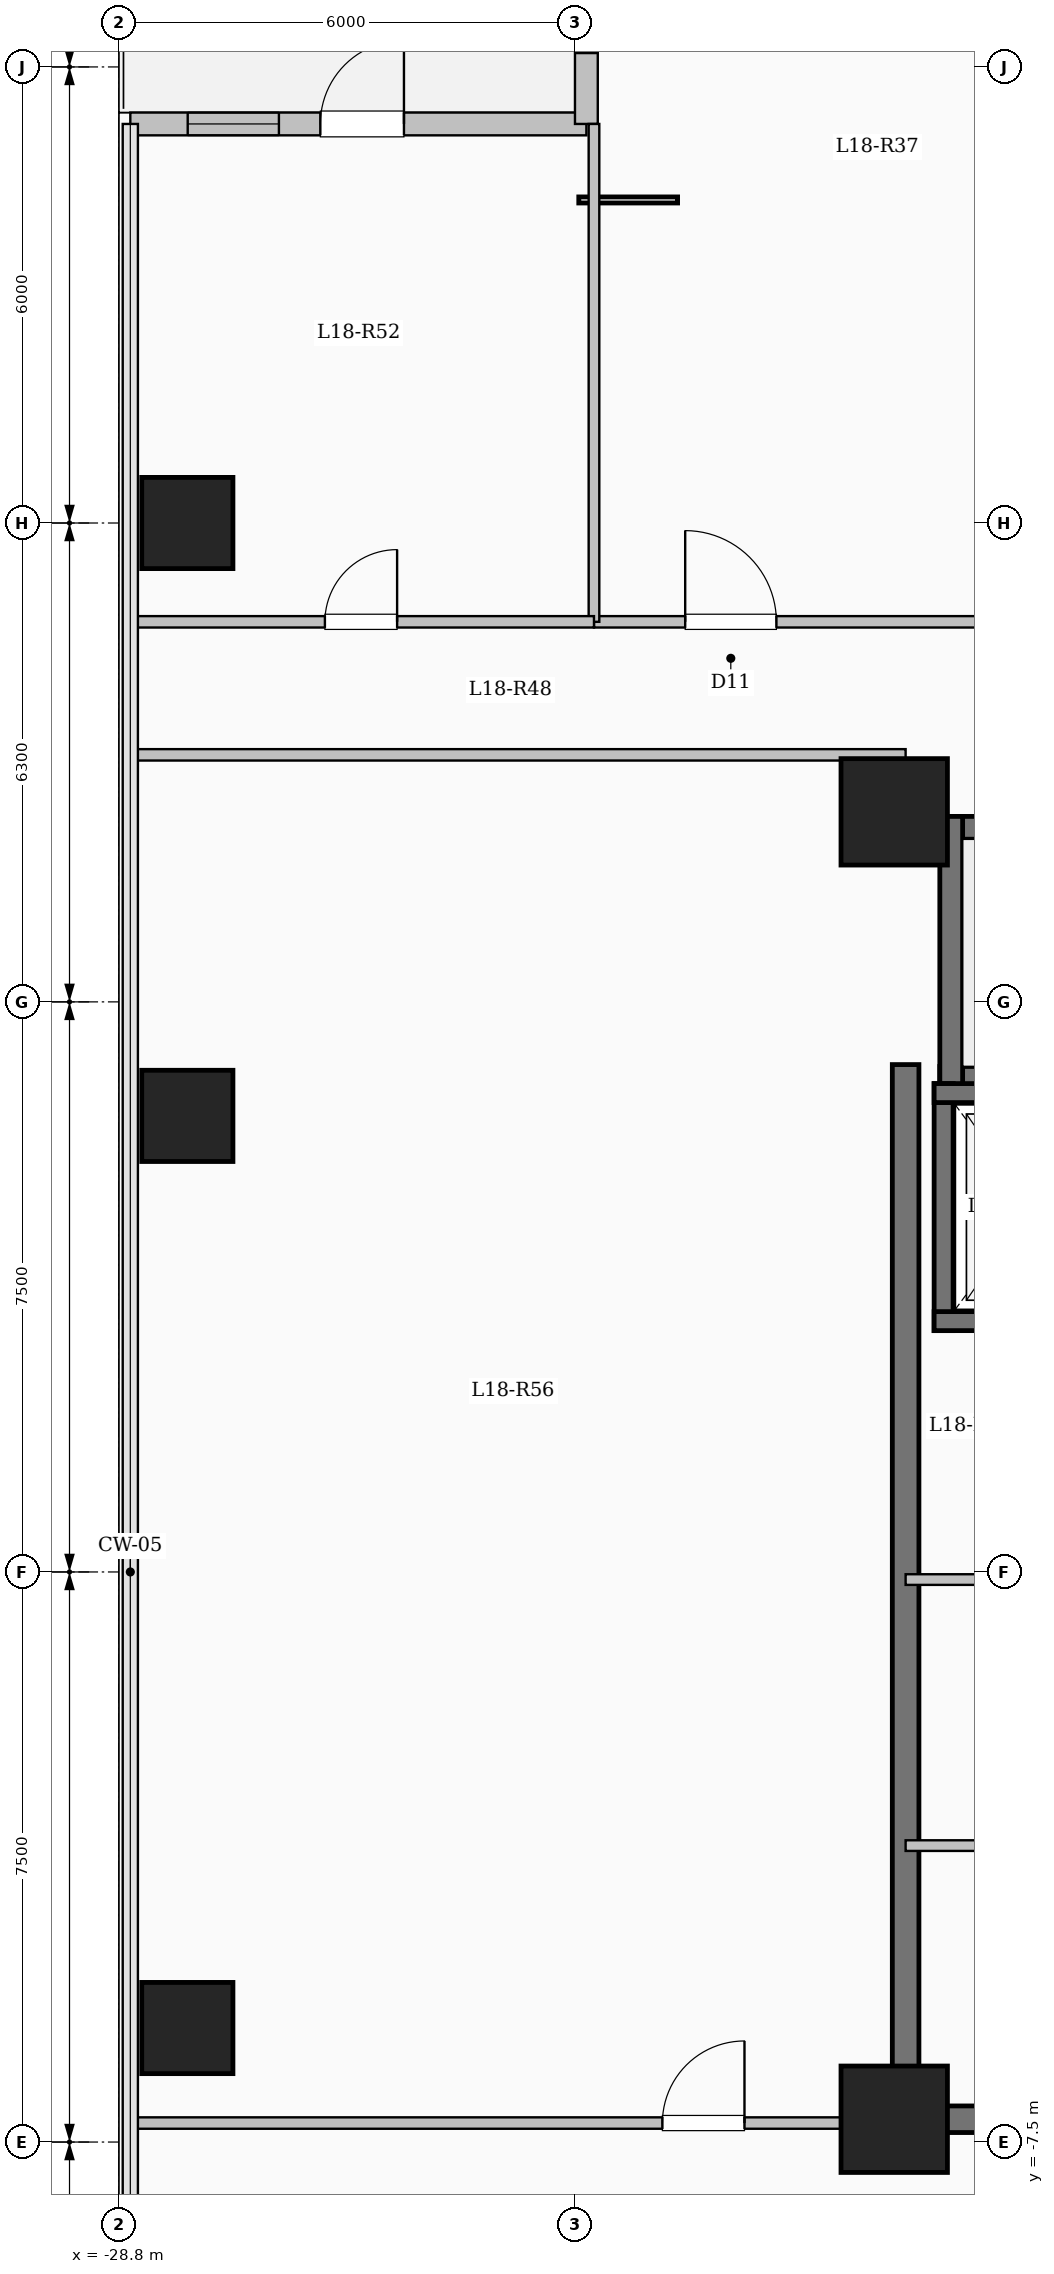
"""IFC4 building model, lengths in metres.
Left out: names, types, materials, properties, quantities, classifications, styles, units other than length and angle.
Written with IfcOpenShell. Run it as: python <this file> out.ifc"""

import sys

from ifc_helpers import new_model, si_unit, direction, frame, frame_2d, origin, origin_2d, place, context, subcontext, project, spatial, rectangle, extrude, element, fill, save


model = new_model("IFC4")
c1 = context("Model", 3, precision=1e-05, world=origin(), true_north=direction((0.0, 1.0)))
c2 = subcontext(c1, "Body", "Model", "MODEL_VIEW")
j1 = project(units=[si_unit("LENGTHUNIT", "METRE"), si_unit("PLANEANGLEUNIT", "RADIAN")], contexts=[c1])
p1 = place(None, origin())
s1 = spatial("IfcSite", under=j1, at=p1, CompositionType="ELEMENT")
p2 = place(p1, origin())
s2 = spatial("IfcBuilding", under=s1, at=p2, CompositionType="ELEMENT")
p3 = place(p2, frame((0.0, 0.0, 68.7)))
s3 = spatial("IfcBuildingStorey", under=s2, at=p3, CompositionType="ELEMENT", Elevation=68.7)
for number, where, z_axis, x_axis in (
    (1, (-18.6, -7.2, 0.0), (0.0, 0.0, 1.0), (1.0, 0.0, 0.0)),
    (2, (-18.6, 10.0, 0.0), (0.0, 0.0, 1.0), (1.0, 0.0, 0.0)),
):
    element("IfcColumn", number, at=place(p3, frame(where, z_axis=z_axis, x_axis=x_axis)), inside=s3, PredefinedType="COLUMN", context=c2, shape_type="SweptSolid", body=[
        extrude(rectangle(XDim=1.4, YDim=1.4, at=origin_2d()), origin(), (0.0, 0.0, 1.0), 4.5),
    ])
for number, where, z_axis, x_axis in (
    (3, (-27.9, -6.0, 0.0), (0.0, 0.0, 1.0), (1.0, 0.0, 0.0)),
    (4, (-27.9, 6.0, 0.0), (0.0, 0.0, 1.0), (1.0, 0.0, 0.0)),
    (5, (-27.9, 13.8, 0.0), (0.0, 0.0, 1.0), (1.0, 0.0, 0.0)),
):
    element("IfcColumn", number, at=place(p3, frame(where, z_axis=z_axis, x_axis=x_axis)), inside=s3, PredefinedType="COLUMN", context=c2, shape_type="SweptSolid", body=[
        extrude(rectangle(XDim=1.2, YDim=1.2, at=origin_2d()), origin(), (0.0, 0.0, 1.0), 4.5),
    ])
p4 = place(p3, frame((-28.65, 19.05, 0.0), z_axis=(0.0, 0.0, 1.0), x_axis=(1.0, 0.0, 0.0)))
e6 = element("IfcWall", 6, at=p4, inside=s3, PredefinedType="SOLIDWALL", context=c2, shape_type="SweptSolid", body=[
    extrude(rectangle(XDim=6.0, YDim=0.3, at=frame_2d((3.0, 0.0))), origin(), (0.0, 0.0, 1.0), 4.2),
])
p5 = place(p4, frame((2.5, 0.0, 0.0)))
e7 = element("IfcOpeningElement", 7, at=p5, cuts=e6, PredefinedType="OPENING", context=c2, shape_type="SweptSolid", body=[
    extrude(rectangle(XDim=1.1, YDim=2.2, at=frame_2d((0.55, 1.1))), frame((0.0, 0.16, 0.0), z_axis=(0.0, -1.0, 0.0), x_axis=(1.0, 0.0, 0.0)), (0.0, 0.0, 1.0), 0.32),
])
p6 = place(p4, frame((0.755, 0.0, 0.95)))
e8 = element("IfcOpeningElement", 8, at=p6, cuts=e6, PredefinedType="OPENING", context=c2, shape_type="SweptSolid", body=[
    extrude(rectangle(XDim=1.2, YDim=1.5, at=frame_2d((0.6, 0.75))), frame((0.0, 0.16, 0.0), z_axis=(0.0, -1.0, 0.0), x_axis=(1.0, 0.0, 0.0)), (0.0, 0.0, 1.0), 0.32),
])
p7 = place(p3, frame((-22.65, 19.05, 0.0), z_axis=(0.0, 0.0, 1.0), x_axis=(0.0, 1.0, 0.0)))
e9 = element("IfcWall", 9, at=p7, inside=s3, PredefinedType="SOLIDWALL", context=c2, shape_type="SweptSolid", body=[
    extrude(rectangle(XDim=4.5, YDim=0.3, at=frame_2d((2.25, 0.0))), origin(), (0.0, 0.0, 1.0), 4.2),
])
p8 = place(p7, frame((0.933, 0.0, 0.85)))
e10 = element("IfcOpeningElement", 10, at=p8, cuts=e9, PredefinedType="OPENING", context=c2, shape_type="SweptSolid", body=[
    extrude(rectangle(XDim=2.6, YDim=2.4, at=frame_2d((1.3, 1.2))), frame((0.0, 0.16, 0.0), z_axis=(0.0, -1.0, 0.0), x_axis=(1.0, 0.0, 0.0)), (0.0, 0.0, 1.0), 0.32),
])
p9 = place(p3, frame((-18.0, 9.79, 0.0), z_axis=(0.0, 0.0, 1.0), x_axis=(1.0, 0.0, 0.0)))
e11 = element("IfcWall", 11, at=p9, inside=s3, PredefinedType="SHEAR", context=c2, shape_type="SweptSolid", body=[
    extrude(rectangle(XDim=8.0, YDim=0.3, at=frame_2d((4.0, 0.0))), origin(), (0.0, 0.0, 1.0), 4.5),
])
p10 = place(p3, frame((-18.0, 6.5, 0.0), z_axis=(0.0, 0.0, 1.0), x_axis=(1.0, 0.0, 0.0)))
e12 = element("IfcWall", 12, at=p10, inside=s3, PredefinedType="SHEAR", context=c2, shape_type="SweptSolid", body=[
    extrude(rectangle(XDim=8.0, YDim=0.3, at=frame_2d((4.0, 0.0))), origin(), (0.0, 0.0, 1.0), 4.5),
])
p11 = place(p10, frame((6.45, 0.0, 0.0)))
e13 = element("IfcOpeningElement", 13, at=p11, cuts=e12, PredefinedType="OPENING", context=c2, shape_type="SweptSolid", body=[
    extrude(rectangle(XDim=1.0, YDim=2.15, at=frame_2d((0.5, 1.075))), frame((0.0, 0.16, 0.0), z_axis=(0.0, -1.0, 0.0), x_axis=(1.0, 0.0, 0.0)), (0.0, 0.0, 1.0), 0.32),
])
p12 = place(p3, frame((-17.85, 6.35, 0.0), z_axis=(0.0, 0.0, 1.0), x_axis=(0.0, 1.0, 0.0)))
e14 = element("IfcWall", 14, at=p12, inside=s3, PredefinedType="SHEAR", context=c2, shape_type="SweptSolid", body=[
    extrude(rectangle(XDim=3.59, YDim=0.3, at=frame_2d((1.795, 0.0))), origin(), (0.0, 0.0, 1.0), 4.5),
])
p13 = place(p3, frame((-17.95, 3.175, 0.0), z_axis=(0.0, 0.0, 1.0), x_axis=(0.0, 1.0, 0.0)))
e15 = element("IfcWall", 15, at=p13, inside=s3, PredefinedType="SHEAR", context=c2, shape_type="SweptSolid", body=[
    extrude(rectangle(XDim=3.25, YDim=0.25, at=frame_2d((1.625, 0.0))), origin(), (0.0, 0.0, 1.0), 4.5),
])
for number, where, z_axis, x_axis in (
    (16, (-18.075, 3.3, 0.0), (0.0, 0.0, 1.0), (1.0, 0.0, 0.0)),
    (17, (-18.075, 6.3, 0.0), (0.0, 0.0, 1.0), (1.0, 0.0, 0.0)),
):
    element("IfcWall", number, at=place(p3, frame(where, z_axis=z_axis, x_axis=x_axis)), inside=s3, PredefinedType="SHEAR", context=c2, shape_type="SweptSolid", body=[
        extrude(rectangle(XDim=2.55, YDim=0.25, at=frame_2d((1.275, 0.0))), origin(), (0.0, 0.0, 1.0), 4.5),
    ])
p14 = place(p3, frame((-18.45, -7.375, 0.0), z_axis=(0.0, 0.0, 1.0), x_axis=(0.0, 1.0, 0.0)))
e18 = element("IfcWall", 18, at=p14, inside=s3, PredefinedType="SHEAR", context=c2, shape_type="SweptSolid", body=[
    extrude(rectangle(XDim=14.05, YDim=0.35, at=frame_2d((7.025, 0.0))), origin(), (0.0, 0.0, 1.0), 4.5),
])
p15 = place(p3, frame((-18.625, -7.2, 0.0), z_axis=(0.0, 0.0, 1.0), x_axis=(1.0, 0.0, 0.0)))
e19 = element("IfcWall", 19, at=p15, inside=s3, PredefinedType="SHEAR", context=c2, shape_type="SweptSolid", body=[
    extrude(rectangle(XDim=8.55, YDim=0.35, at=frame_2d((4.275, 0.0))), origin(), (0.0, 0.0, 1.0), 4.5),
])
p16 = place(p3, frame((-18.45, -3.6, 0.0), z_axis=(0.0, 0.0, 1.0), x_axis=(1.0, 0.0, 0.0)))
e20 = element("IfcWall", 20, at=p16, inside=s3, PredefinedType="PARTITIONING", context=c2, shape_type="SweptSolid", body=[
    extrude(rectangle(XDim=3.05, YDim=0.14, at=frame_2d((1.525, 0.0))), origin(), (0.0, 0.0, 1.0), 4.2),
])
p17 = place(p16, frame((1.05, 0.0, 0.0)))
e21 = element("IfcOpeningElement", 21, at=p17, cuts=e20, PredefinedType="OPENING", context=c2, shape_type="SweptSolid", body=[
    extrude(rectangle(XDim=0.9, YDim=2.08, at=frame_2d((0.45, 1.04))), frame((0.0, 0.08, 0.0), z_axis=(0.0, -1.0, 0.0), x_axis=(1.0, 0.0, 0.0)), (0.0, 0.0, 1.0), 0.16),
])
p18 = place(p3, frame((-18.45, -0.1, 0.0), z_axis=(0.0, 0.0, 1.0), x_axis=(1.0, 0.0, 0.0)))
e22 = element("IfcWall", 22, at=p18, inside=s3, PredefinedType="PARTITIONING", context=c2, shape_type="SweptSolid", body=[
    extrude(rectangle(XDim=3.05, YDim=0.14, at=frame_2d((1.525, 0.0))), origin(), (0.0, 0.0, 1.0), 4.2),
])
p19 = place(p18, frame((1.05, 0.0, 0.0)))
e23 = element("IfcOpeningElement", 23, at=p19, cuts=e22, PredefinedType="OPENING", context=c2, shape_type="SweptSolid", body=[
    extrude(rectangle(XDim=0.9, YDim=2.08, at=frame_2d((0.45, 1.04))), frame((0.0, 0.08, 0.0), z_axis=(0.0, -1.0, 0.0), x_axis=(1.0, 0.0, 0.0)), (0.0, 0.0, 1.0), 0.16),
])
p20 = place(p3, frame((-22.55, 12.5, 0.0), z_axis=(0.0, 0.0, 1.0), x_axis=(1.0, 0.0, 0.0)))
e24 = element("IfcWall", 24, at=p20, inside=s3, PredefinedType="PARTITIONING", context=c2, shape_type="SweptSolid", body=[
    extrude(rectangle(XDim=18.7, YDim=0.15, at=frame_2d((9.35, 0.0))), origin(), (0.0, 0.0, 1.0), 4.2),
])
p21 = place(p20, frame((1.2, 0.0, 0.0)))
e25 = element("IfcOpeningElement", 25, at=p21, cuts=e24, PredefinedType="OPENING", context=c2, shape_type="SweptSolid", body=[
    extrude(rectangle(XDim=1.2, YDim=2.15, at=frame_2d((0.6, 1.075))), frame((0.0, 0.085, 0.0), z_axis=(0.0, -1.0, 0.0), x_axis=(1.0, 0.0, 0.0)), (0.0, 0.0, 1.0), 0.17),
])
p22 = place(p20, frame((8.633, 0.0, 0.0)))
e26 = element("IfcOpeningElement", 26, at=p22, cuts=e24, PredefinedType="OPENING", context=c2, shape_type="SweptSolid", body=[
    extrude(rectangle(XDim=1.08, YDim=2.15, at=frame_2d((0.54, 1.075))), frame((0.0, 0.085, 0.0), z_axis=(0.0, -1.0, 0.0), x_axis=(1.0, 0.0, 0.0)), (0.0, 0.0, 1.0), 0.17),
])
p23 = place(p3, frame((-28.68, -7.25, 0.0), z_axis=(0.0, 0.0, 1.0), x_axis=(1.0, 0.0, 0.0)))
e27 = element("IfcWall", 27, at=p23, inside=s3, PredefinedType="PARTITIONING", context=c2, shape_type="SweptSolid", body=[
    extrude(rectangle(XDim=10.23, YDim=0.15, at=frame_2d((5.115, 0.0))), origin(), (0.0, 0.0, 1.0), 4.2),
])
p24 = place(p23, frame((7.03, 0.0, 0.0)))
e28 = element("IfcOpeningElement", 28, at=p24, cuts=e27, PredefinedType="OPENING", context=c2, shape_type="SweptSolid", body=[
    extrude(rectangle(XDim=1.08, YDim=2.15, at=frame_2d((0.54, 1.075))), frame((0.0, 0.085, 0.0), z_axis=(0.0, -1.0, 0.0), x_axis=(1.0, 0.0, 0.0)), (0.0, 0.0, 1.0), 0.17),
])
p25 = place(p3, frame((-28.68, 10.75, 0.0), z_axis=(0.0, 0.0, 1.0), x_axis=(1.0, 0.0, 0.0)))
e29 = element("IfcWall", 29, at=p25, inside=s3, PredefinedType="PARTITIONING", context=c2, shape_type="SweptSolid", body=[
    extrude(rectangle(XDim=10.23, YDim=0.15, at=frame_2d((5.115, 0.0))), origin(), (0.0, 0.0, 1.0), 4.2),
])
p26 = place(p3, frame((-22.55, 12.5, 0.0), z_axis=(0.0, 0.0, 1.0), x_axis=(0.0, 1.0, 0.0)))
e30 = element("IfcWall", 30, at=p26, inside=s3, PredefinedType="PARTITIONING", context=c2, shape_type="SweptSolid", body=[
    extrude(rectangle(XDim=6.55, YDim=0.14, at=frame_2d((3.275, 0.0))), origin(), (0.0, 0.0, 1.0), 4.2),
])
p27 = place(p3, frame((-28.68, 12.5, 0.0), z_axis=(0.0, 0.0, 1.0), x_axis=(1.0, 0.0, 0.0)))
e31 = element("IfcWall", 31, at=p27, inside=s3, PredefinedType="PARTITIONING", context=c2, shape_type="SweptSolid", body=[
    extrude(rectangle(XDim=6.13, YDim=0.15, at=frame_2d((3.065, 0.0))), origin(), (0.0, 0.0, 1.0), 4.2),
])
p28 = place(p27, frame((2.59, 0.0, 0.0)))
e32 = element("IfcOpeningElement", 32, at=p28, cuts=e31, PredefinedType="OPENING", context=c2, shape_type="SweptSolid", body=[
    extrude(rectangle(XDim=0.95, YDim=2.15, at=frame_2d((0.475, 1.075))), frame((0.0, 0.085, 0.0), z_axis=(0.0, -1.0, 0.0), x_axis=(1.0, 0.0, 0.0)), (0.0, 0.0, 1.0), 0.17),
])
p29 = place(p5, origin())
e33 = element("IfcDoor", 33, at=p29, inside=s3, OperationType="SINGLE_SWING_RIGHT", PredefinedType="DOOR", context=c2, shape_type="SweptSolid", body=[
    extrude(rectangle(XDim=1.1, YDim=2.2, at=frame_2d((0.55, 1.1))), frame((0.0, 0.025, 0.0), z_axis=(0.0, -1.0, 0.0), x_axis=(1.0, 0.0, 0.0)), (0.0, 0.0, 1.0), 0.05),
])
fill(e7, e33)
p30 = place(p6, origin())
e34 = element("IfcWindow", 34, at=p30, inside=s3, PartitioningType="SINGLE_PANEL", PredefinedType="WINDOW", context=c2, shape_type="SweptSolid", body=[
    extrude(rectangle(XDim=1.2, YDim=1.5, at=frame_2d((0.6, 0.75))), frame((0.0, 0.03, 0.0), z_axis=(0.0, -1.0, 0.0), x_axis=(1.0, 0.0, 0.0)), (0.0, 0.0, 1.0), 0.06),
])
fill(e8, e34)
p31 = place(p8, origin())
e35 = element("IfcWindow", 35, at=p31, inside=s3, PartitioningType="SINGLE_PANEL", PredefinedType="WINDOW", context=c2, shape_type="SweptSolid", body=[
    extrude(rectangle(XDim=2.6, YDim=2.4, at=frame_2d((1.3, 1.2))), frame((0.0, 0.03, 0.0), z_axis=(0.0, -1.0, 0.0), x_axis=(1.0, 0.0, 0.0)), (0.0, 0.0, 1.0), 0.06),
])
fill(e10, e35)
p32 = place(p21, origin())
e36 = element("IfcDoor", 36, at=p32, inside=s3, OperationType="SINGLE_SWING_LEFT", PredefinedType="DOOR", context=c2, shape_type="SweptSolid", body=[
    extrude(rectangle(XDim=1.2, YDim=2.15, at=frame_2d((0.6, 1.075))), frame((0.0, 0.025, 0.0), z_axis=(0.0, -1.0, 0.0), x_axis=(1.0, 0.0, 0.0)), (0.0, 0.0, 1.0), 0.05),
])
fill(e25, e36)
p33 = place(p28, origin())
e37 = element("IfcDoor", 37, at=p33, inside=s3, OperationType="SINGLE_SWING_RIGHT", PredefinedType="DOOR", context=c2, shape_type="SweptSolid", body=[
    extrude(rectangle(XDim=0.95, YDim=2.15, at=frame_2d((0.475, 1.075))), frame((0.0, 0.025, 0.0), z_axis=(0.0, -1.0, 0.0), x_axis=(1.0, 0.0, 0.0)), (0.0, 0.0, 1.0), 0.05),
])
fill(e32, e37)
p34 = place(p24, origin())
e38 = element("IfcDoor", 38, at=p34, inside=s3, OperationType="SINGLE_SWING_RIGHT", PredefinedType="DOOR", context=c2, shape_type="SweptSolid", body=[
    extrude(rectangle(XDim=1.08, YDim=2.15, at=frame_2d((0.54, 1.075))), frame((0.0, 0.025, 0.0), z_axis=(0.0, -1.0, 0.0), x_axis=(1.0, 0.0, 0.0)), (0.0, 0.0, 1.0), 0.05),
])
fill(e28, e38)
save(model, sys.argv[1])
